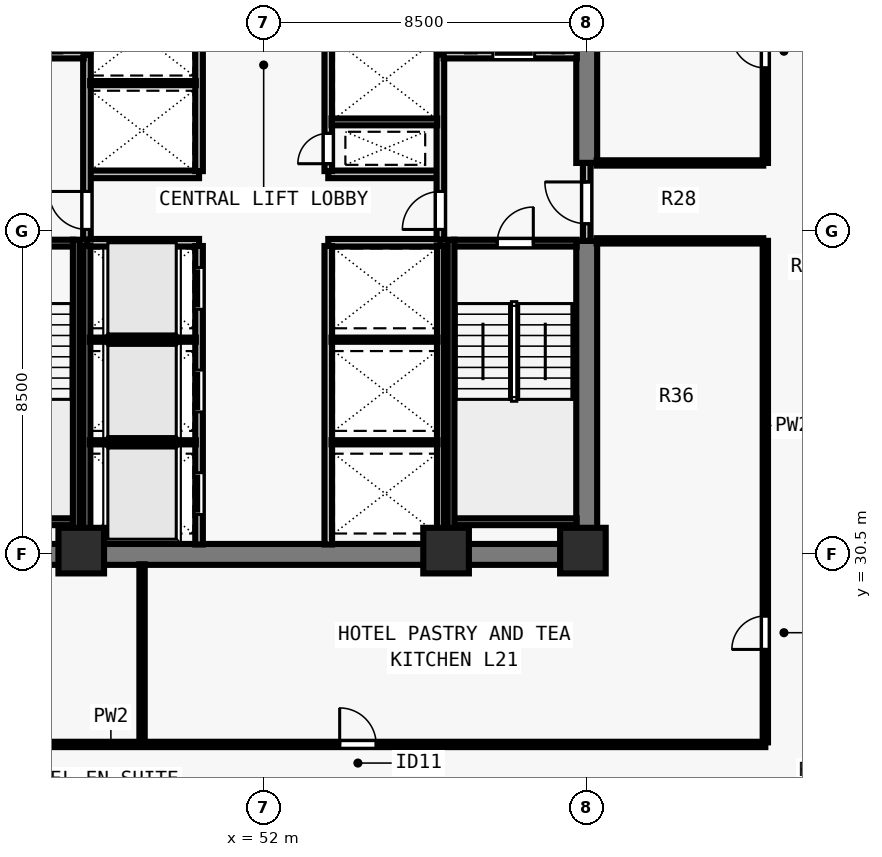
"""IFC4 building model, lengths in metres.
Left out: names, types, materials, properties, quantities, classifications, styles, units other than length and angle.
Written with IfcOpenShell. Run it as: python <this file> out.ifc"""

import sys

from ifc_helpers import new_model, si_unit, direction, frame, frame_2d, origin, origin_2d, place, context, subcontext, project, spatial, rectangle, extrude, element, fill, save


model = new_model("IFC4")
c1 = context("Model", 3, precision=1e-05, world=origin(), true_north=direction((0.0, 1.0)))
c2 = subcontext(c1, "Body", "Model", "MODEL_VIEW")
j1 = project(units=[si_unit("LENGTHUNIT", "METRE"), si_unit("PLANEANGLEUNIT", "RADIAN")], contexts=[c1])
p1 = place(None, origin())
s1 = spatial("IfcSite", under=j1, at=p1, CompositionType="ELEMENT")
p2 = place(p1, origin())
s2 = spatial("IfcBuilding", under=s1, at=p2, CompositionType="ELEMENT")
p3 = place(p2, frame((0.0, 0.0, 79.5)))
s3 = spatial("IfcBuildingStorey", under=s2, at=p3, CompositionType="ELEMENT", Elevation=79.5)
for number, where, z_axis, x_axis in (
    (1, (47.2, 30.6, 0.0), (0.0, 0.0, 1.0), (1.0, 0.0, 0.0)),
    (2, (56.8, 30.6, 0.0), (0.0, 0.0, 1.0), (1.0, 0.0, 0.0)),
    (3, (60.4, 30.6, 0.0), (0.0, 0.0, 1.0), (1.0, 0.0, 0.0)),
):
    element("IfcColumn", number, at=place(p3, frame(where, z_axis=z_axis, x_axis=x_axis)), inside=s3, PredefinedType="COLUMN", context=c2, shape_type="SweptSolid", body=[
        extrude(rectangle(XDim=1.2, YDim=1.2, at=origin_2d()), origin(), (0.0, 0.0, 1.0), 3.5),
    ])
p4 = place(p3, frame((43.225, 30.5, 0.0), z_axis=(0.0, 0.0, 1.0), x_axis=(1.0, 0.0, 0.0)))
e4 = element("IfcWall", 4, at=p4, inside=s3, PredefinedType="SHEAR", context=c2, shape_type="SweptSolid", body=[
    extrude(rectangle(XDim=17.55, YDim=0.55, at=frame_2d((8.775, 0.0))), origin(), (0.0, 0.0, 1.0), 3.28),
])
p5 = place(p3, frame((60.5, 30.765, 0.0), z_axis=(0.0, 0.0, 1.0), x_axis=(0.0, 1.0, 0.0)))
e5 = element("IfcWall", 5, at=p5, inside=s3, PredefinedType="SHEAR", context=c2, shape_type="SweptSolid", body=[
    extrude(rectangle(XDim=7.985, YDim=0.55, at=frame_2d((3.993, 0.0))), origin(), (0.0, 0.0, 1.0), 3.28),
])
p6 = place(p3, frame((60.5, 40.8, 0.0), z_axis=(0.0, 0.0, 1.0), x_axis=(0.0, 1.0, 0.0)))
e6 = element("IfcWall", 6, at=p6, inside=s3, PredefinedType="SHEAR", context=c2, shape_type="SweptSolid", body=[
    extrude(rectangle(XDim=6.435, YDim=0.55, at=frame_2d((3.218, 0.0))), origin(), (0.0, 0.0, 1.0), 3.28),
])
for number, where, z_axis, x_axis in (
    (7, (47.35, 38.7, 0.0), (0.0, 0.0, 1.0), (1.0, 0.0, 0.0)),
    (8, (47.35, 40.5, 0.0), (0.0, 0.0, 1.0), (1.0, 0.0, 0.0)),
    (9, (53.7, 38.7, 0.0), (0.0, 0.0, 1.0), (1.0, 0.0, 0.0)),
    (10, (53.7, 40.5, 0.0), (0.0, 0.0, 1.0), (1.0, 0.0, 0.0)),
):
    element("IfcWall", number, at=place(p3, frame(where, z_axis=z_axis, x_axis=x_axis)), inside=s3, PredefinedType="SOLIDWALL", context=c2, shape_type="SweptSolid", body=[
        extrude(rectangle(XDim=2.95, YDim=0.2, at=frame_2d((1.475, 0.0))), origin(), (0.0, 0.0, 1.0), 3.28),
    ])
p7 = place(p3, frame((50.3, 30.76, 0.0), z_axis=(0.0, 0.0, 1.0), x_axis=(0.0, 1.0, 0.0)))
e11 = element("IfcWall", 11, at=p7, inside=s3, PredefinedType="SOLIDWALL", context=c2, shape_type="SweptSolid", body=[
    extrude(rectangle(XDim=7.855, YDim=0.2, at=frame_2d((3.927, 0.0))), origin(), (0.0, 0.0, 1.0), 3.28),
])
p8 = place(p7, frame((0.79, 0.0, 0.0)))
e12 = element("IfcOpeningElement", 12, at=p8, cuts=e11, PredefinedType="OPENING", context=c2, shape_type="SweptSolid", body=[
    extrude(rectangle(XDim=1.1, YDim=2.2, at=frame_2d((0.55, 1.1))), frame((0.0, 0.11, 0.0), z_axis=(0.0, -1.0, 0.0), x_axis=(1.0, 0.0, 0.0)), (0.0, 0.0, 1.0), 0.22),
])
p9 = place(p7, frame((3.49, 0.0, 0.0)))
e13 = element("IfcOpeningElement", 13, at=p9, cuts=e11, PredefinedType="OPENING", context=c2, shape_type="SweptSolid", body=[
    extrude(rectangle(XDim=1.1, YDim=2.2, at=frame_2d((0.55, 1.1))), frame((0.0, 0.11, 0.0), z_axis=(0.0, -1.0, 0.0), x_axis=(1.0, 0.0, 0.0)), (0.0, 0.0, 1.0), 0.22),
])
p10 = place(p7, frame((6.19, 0.0, 0.0)))
e14 = element("IfcOpeningElement", 14, at=p10, cuts=e11, PredefinedType="OPENING", context=c2, shape_type="SweptSolid", body=[
    extrude(rectangle(XDim=1.1, YDim=2.2, at=frame_2d((0.55, 1.1))), frame((0.0, 0.11, 0.0), z_axis=(0.0, -1.0, 0.0), x_axis=(1.0, 0.0, 0.0)), (0.0, 0.0, 1.0), 0.22),
])
p11 = place(p3, frame((53.7, 30.76, 0.0), z_axis=(0.0, 0.0, 1.0), x_axis=(0.0, 1.0, 0.0)))
e15 = element("IfcWall", 15, at=p11, inside=s3, PredefinedType="SOLIDWALL", context=c2, shape_type="SweptSolid", body=[
    extrude(rectangle(XDim=7.855, YDim=0.2, at=frame_2d((3.927, 0.0))), origin(), (0.0, 0.0, 1.0), 3.28),
])
p12 = place(p3, frame((50.3, 40.585, 0.0), z_axis=(0.0, 0.0, 1.0), x_axis=(0.0, 1.0, 0.0)))
e16 = element("IfcWall", 16, at=p12, inside=s3, PredefinedType="SOLIDWALL", context=c2, shape_type="SweptSolid", body=[
    extrude(rectangle(XDim=6.655, YDim=0.2, at=frame_2d((3.328, 0.0))), origin(), (0.0, 0.0, 1.0), 3.28),
])
p13 = place(p12, frame((5.065, 0.0, 0.0)))
e17 = element("IfcOpeningElement", 17, at=p13, cuts=e16, PredefinedType="OPENING", context=c2, shape_type="SweptSolid", body=[
    extrude(rectangle(XDim=0.8, YDim=2.08, at=frame_2d((0.4, 1.04))), frame((0.0, 0.11, 0.0), z_axis=(0.0, -1.0, 0.0), x_axis=(1.0, 0.0, 0.0)), (0.0, 0.0, 1.0), 0.22),
])
p14 = place(p3, frame((53.7, 40.585, 0.0), z_axis=(0.0, 0.0, 1.0), x_axis=(0.0, 1.0, 0.0)))
e18 = element("IfcWall", 18, at=p14, inside=s3, PredefinedType="SOLIDWALL", context=c2, shape_type="SweptSolid", body=[
    extrude(rectangle(XDim=6.655, YDim=0.2, at=frame_2d((3.328, 0.0))), origin(), (0.0, 0.0, 1.0), 3.28),
])
p15 = place(p14, frame((0.195, 0.0, 0.0)))
e19 = element("IfcOpeningElement", 19, at=p15, cuts=e18, PredefinedType="OPENING", context=c2, shape_type="SweptSolid", body=[
    extrude(rectangle(XDim=0.8, YDim=2.08, at=frame_2d((0.4, 1.04))), frame((0.0, 0.11, 0.0), z_axis=(0.0, -1.0, 0.0), x_axis=(1.0, 0.0, 0.0)), (0.0, 0.0, 1.0), 0.22),
])
p16 = place(p14, frame((4.265, 0.0, 0.0)))
e20 = element("IfcOpeningElement", 20, at=p16, cuts=e18, PredefinedType="OPENING", context=c2, shape_type="SweptSolid", body=[
    extrude(rectangle(XDim=0.95, YDim=2.12, at=frame_2d((0.475, 1.06))), frame((0.0, 0.11, 0.0), z_axis=(0.0, -1.0, 0.0), x_axis=(1.0, 0.0, 0.0)), (0.0, 0.0, 1.0), 0.22),
])
p17 = place(p3, frame((47.35, 38.785, 0.0), z_axis=(0.0, 0.0, 1.0), x_axis=(0.0, 1.0, 0.0)))
e21 = element("IfcWall", 21, at=p17, inside=s3, PredefinedType="SOLIDWALL", context=c2, shape_type="SweptSolid", body=[
    extrude(rectangle(XDim=4.865, YDim=0.2, at=frame_2d((2.433, 0.0))), origin(), (0.0, 0.0, 1.0), 3.28),
])
p18 = place(p17, frame((0.265, 0.0, 0.0)))
e22 = element("IfcOpeningElement", 22, at=p18, cuts=e21, PredefinedType="OPENING", context=c2, shape_type="SweptSolid", body=[
    extrude(rectangle(XDim=1.0, YDim=2.15, at=frame_2d((0.5, 1.075))), frame((0.0, 0.11, 0.0), z_axis=(0.0, -1.0, 0.0), x_axis=(1.0, 0.0, 0.0)), (0.0, 0.0, 1.0), 0.22),
])
p19 = place(p3, frame((43.76, 43.65, 0.0), z_axis=(0.0, 0.0, 1.0), x_axis=(1.0, 0.0, 0.0)))
e23 = element("IfcWall", 23, at=p19, inside=s3, PredefinedType="SOLIDWALL", context=c2, shape_type="SweptSolid", body=[
    extrude(rectangle(XDim=3.505, YDim=0.2, at=frame_2d((1.752, 0.0))), origin(), (0.0, 0.0, 1.0), 3.28),
])
p20 = place(p19, frame((1.11, 0.0, 0.0)))
e24 = element("IfcOpeningElement", 24, at=p20, cuts=e23, PredefinedType="OPENING", context=c2, shape_type="SweptSolid", body=[
    extrude(rectangle(XDim=1.1, YDim=2.2, at=frame_2d((0.55, 1.1))), frame((0.0, 0.11, 0.0), z_axis=(0.0, -1.0, 0.0), x_axis=(1.0, 0.0, 0.0)), (0.0, 0.0, 1.0), 0.22),
])
p21 = place(p3, frame((60.5, 38.75, 0.0), z_axis=(0.0, 0.0, 1.0), x_axis=(0.0, 1.0, 0.0)))
e25 = element("IfcWall", 25, at=p21, inside=s3, PredefinedType="SOLIDWALL", context=c2, shape_type="SweptSolid", body=[
    extrude(rectangle(XDim=2.05, YDim=0.2, at=frame_2d((1.025, 0.0))), origin(), (0.0, 0.0, 1.0), 3.28),
])
p22 = place(p21, frame((0.45, 0.0, 0.0)))
e26 = element("IfcOpeningElement", 26, at=p22, cuts=e25, PredefinedType="OPENING", context=c2, shape_type="SweptSolid", body=[
    extrude(rectangle(XDim=1.1, YDim=2.15, at=frame_2d((0.55, 1.075))), frame((0.0, 0.11, 0.0), z_axis=(0.0, -1.0, 0.0), x_axis=(1.0, 0.0, 0.0)), (0.0, 0.0, 1.0), 0.22),
])
p23 = place(p3, frame((56.65, 38.785, 0.0), z_axis=(0.0, 0.0, 1.0), x_axis=(0.0, 1.0, 0.0)))
e27 = element("IfcWall", 27, at=p23, inside=s3, PredefinedType="SOLIDWALL", context=c2, shape_type="SweptSolid", body=[
    extrude(rectangle(XDim=4.865, YDim=0.2, at=frame_2d((2.433, 0.0))), origin(), (0.0, 0.0, 1.0), 3.28),
])
p24 = place(p23, frame((0.265, 0.0, 0.0)))
e28 = element("IfcOpeningElement", 28, at=p24, cuts=e27, PredefinedType="OPENING", context=c2, shape_type="SweptSolid", body=[
    extrude(rectangle(XDim=1.0, YDim=2.15, at=frame_2d((0.5, 1.075))), frame((0.0, 0.11, 0.0), z_axis=(0.0, -1.0, 0.0), x_axis=(1.0, 0.0, 0.0)), (0.0, 0.0, 1.0), 0.22),
])
p25 = place(p3, frame((56.735, 43.65, 0.0), z_axis=(0.0, 0.0, 1.0), x_axis=(1.0, 0.0, 0.0)))
e29 = element("IfcWall", 29, at=p25, inside=s3, PredefinedType="SOLIDWALL", context=c2, shape_type="SweptSolid", body=[
    extrude(rectangle(XDim=3.505, YDim=0.2, at=frame_2d((1.752, 0.0))), origin(), (0.0, 0.0, 1.0), 3.28),
])
p26 = place(p25, frame((1.295, 0.0, 0.0)))
e30 = element("IfcOpeningElement", 30, at=p26, cuts=e29, PredefinedType="OPENING", context=c2, shape_type="SweptSolid", body=[
    extrude(rectangle(XDim=1.1, YDim=2.2, at=frame_2d((0.55, 1.1))), frame((0.0, 0.11, 0.0), z_axis=(0.0, -1.0, 0.0), x_axis=(1.0, 0.0, 0.0)), (0.0, 0.0, 1.0), 0.22),
])
p27 = place(p3, frame((47.35, 30.76, 0.0), z_axis=(0.0, 0.0, 1.0), x_axis=(0.0, 1.0, 0.0)))
e31 = element("IfcWall", 31, at=p27, inside=s3, PredefinedType="SOLIDWALL", context=c2, shape_type="SweptSolid", body=[
    extrude(rectangle(XDim=7.855, YDim=0.18, at=frame_2d((3.927, 0.0))), origin(), (0.0, 0.0, 1.0), 3.28),
])
for number, where, z_axis, x_axis in (
    (32, (47.425, 33.45, 0.0), (0.0, 0.0, 1.0), (1.0, 0.0, 0.0)),
    (33, (47.425, 36.15, 0.0), (0.0, 0.0, 1.0), (1.0, 0.0, 0.0)),
):
    element("IfcWall", number, at=place(p3, frame(where, z_axis=z_axis, x_axis=x_axis)), inside=s3, PredefinedType="PARTITIONING", context=c2, shape_type="SweptSolid", body=[
        extrude(rectangle(XDim=2.79, YDim=0.11, at=frame_2d((1.395, 0.0))), origin(), (0.0, 0.0, 1.0), 3.28),
    ])
p28 = place(p3, frame((56.65, 30.76, 0.0), z_axis=(0.0, 0.0, 1.0), x_axis=(0.0, 1.0, 0.0)))
e34 = element("IfcWall", 34, at=p28, inside=s3, PredefinedType="SOLIDWALL", context=c2, shape_type="SweptSolid", body=[
    extrude(rectangle(XDim=7.855, YDim=0.18, at=frame_2d((3.927, 0.0))), origin(), (0.0, 0.0, 1.0), 3.28),
])
for number, where, z_axis, x_axis in (
    (35, (53.785, 33.45, 0.0), (0.0, 0.0, 1.0), (1.0, 0.0, 0.0)),
    (36, (53.785, 36.15, 0.0), (0.0, 0.0, 1.0), (1.0, 0.0, 0.0)),
):
    element("IfcWall", number, at=place(p3, frame(where, z_axis=z_axis, x_axis=x_axis)), inside=s3, PredefinedType="PARTITIONING", context=c2, shape_type="SweptSolid", body=[
        extrude(rectangle(XDim=2.79, YDim=0.11, at=frame_2d((1.395, 0.0))), origin(), (0.0, 0.0, 1.0), 3.28),
    ])
p29 = place(p3, frame((47.435, 42.9, 0.0), z_axis=(0.0, 0.0, 1.0), x_axis=(1.0, 0.0, 0.0)))
e37 = element("IfcWall", 37, at=p29, inside=s3, PredefinedType="PARTITIONING", context=c2, shape_type="SweptSolid", body=[
    extrude(rectangle(XDim=2.78, YDim=0.11, at=frame_2d((1.39, 0.0))), origin(), (0.0, 0.0, 1.0), 3.28),
])
p30 = place(p3, frame((53.785, 41.88, 0.0), z_axis=(0.0, 0.0, 1.0), x_axis=(1.0, 0.0, 0.0)))
e38 = element("IfcWall", 38, at=p30, inside=s3, PredefinedType="SOLIDWALL", context=c2, shape_type="SweptSolid", body=[
    extrude(rectangle(XDim=2.78, YDim=0.18, at=frame_2d((1.39, 0.0))), origin(), (0.0, 0.0, 1.0), 3.28),
])
p31 = place(p3, frame((38.8, 25.5, 0.0), z_axis=(0.0, 0.0, 1.0), x_axis=(1.0, 0.0, 0.0)))
e39 = element("IfcWall", 39, at=p31, inside=s3, PredefinedType="PARTITIONING", context=c2, shape_type="SweptSolid", body=[
    extrude(rectangle(XDim=26.4, YDim=0.14, at=frame_2d((13.2, 0.0))), origin(), (0.0, 0.0, 1.0), 3.28),
])
p32 = place(p31, frame((2.2, 0.0, 0.0)))
e40 = element("IfcOpeningElement", 40, at=p32, cuts=e39, PredefinedType="OPENING", context=c2, shape_type="SweptSolid", body=[
    extrude(rectangle(XDim=0.96, YDim=2.12, at=frame_2d((0.48, 1.06))), frame((0.0, 0.08, 0.0), z_axis=(0.0, -1.0, 0.0), x_axis=(1.0, 0.0, 0.0)), (0.0, 0.0, 1.0), 0.16),
])
p33 = place(p31, frame((15.2, 0.0, 0.0)))
e41 = element("IfcOpeningElement", 41, at=p33, cuts=e39, PredefinedType="OPENING", context=c2, shape_type="SweptSolid", body=[
    extrude(rectangle(XDim=0.96, YDim=2.12, at=frame_2d((0.48, 1.06))), frame((0.0, 0.08, 0.0), z_axis=(0.0, -1.0, 0.0), x_axis=(1.0, 0.0, 0.0)), (0.0, 0.0, 1.0), 0.16),
])
p34 = place(p3, frame((65.2, 25.555, 0.0), z_axis=(0.0, 0.0, 1.0), x_axis=(0.0, 1.0, 0.0)))
e42 = element("IfcWall", 42, at=p34, inside=s3, PredefinedType="PARTITIONING", context=c2, shape_type="SweptSolid", body=[
    extrude(rectangle(XDim=13.195, YDim=0.14, at=frame_2d((6.598, 0.0))), origin(), (0.0, 0.0, 1.0), 3.28),
])
p35 = place(p34, frame((2.445, 0.0, 0.0)))
e43 = element("IfcOpeningElement", 43, at=p35, cuts=e42, PredefinedType="OPENING", context=c2, shape_type="SweptSolid", body=[
    extrude(rectangle(XDim=0.88, YDim=2.1, at=frame_2d((0.44, 1.05))), frame((0.0, 0.08, 0.0), z_axis=(0.0, -1.0, 0.0), x_axis=(1.0, 0.0, 0.0)), (0.0, 0.0, 1.0), 0.16),
])
p36 = place(p3, frame((65.2, 40.8, 0.0), z_axis=(0.0, 0.0, 1.0), x_axis=(0.0, 1.0, 0.0)))
e44 = element("IfcWall", 44, at=p36, inside=s3, PredefinedType="PARTITIONING", context=c2, shape_type="SweptSolid", body=[
    extrude(rectangle(XDim=11.645, YDim=0.14, at=frame_2d((5.823, 0.0))), origin(), (0.0, 0.0, 1.0), 3.28),
])
p37 = place(p36, frame((2.5, 0.0, 0.0)))
e45 = element("IfcOpeningElement", 45, at=p37, cuts=e44, PredefinedType="OPENING", context=c2, shape_type="SweptSolid", body=[
    extrude(rectangle(XDim=0.88, YDim=2.1, at=frame_2d((0.44, 1.05))), frame((0.0, 0.08, 0.0), z_axis=(0.0, -1.0, 0.0), x_axis=(1.0, 0.0, 0.0)), (0.0, 0.0, 1.0), 0.16),
])
for number, where, z_axis, x_axis in (
    (46, (60.76, 38.75, 0.0), (0.0, 0.0, 1.0), (1.0, 0.0, 0.0)),
    (47, (60.76, 40.8, 0.0), (0.0, 0.0, 1.0), (1.0, 0.0, 0.0)),
):
    element("IfcWall", number, at=place(p3, frame(where, z_axis=z_axis, x_axis=x_axis)), inside=s3, PredefinedType="PARTITIONING", context=c2, shape_type="SweptSolid", body=[
        extrude(rectangle(XDim=4.385, YDim=0.14, at=frame_2d((2.192, 0.0))), origin(), (0.0, 0.0, 1.0), 3.28),
    ])
p38 = place(p3, frame((48.8, 25.555, 0.0), z_axis=(0.0, 0.0, 1.0), x_axis=(0.0, 1.0, 0.0)))
e48 = element("IfcWall", 48, at=p38, inside=s3, PredefinedType="PARTITIONING", context=c2, shape_type="SweptSolid", body=[
    extrude(rectangle(XDim=4.685, YDim=0.14, at=frame_2d((2.343, 0.0))), origin(), (0.0, 0.0, 1.0), 3.28),
])
p39 = place(p3, frame((43.765, 38.69, 0.0), z_axis=(0.0, 0.0, 1.0), x_axis=(1.0, 0.0, 0.0)))
e49 = element("IfcWall", 49, at=p39, inside=s3, PredefinedType="SOLIDWALL", context=c2, shape_type="SweptSolid", body=[
    extrude(rectangle(XDim=3.23, YDim=0.18, at=frame_2d((1.615, 0.0))), origin(), (0.0, 0.0, 1.0), 3.28),
])
p40 = place(p39, frame((1.14, 0.0, 0.0)))
e50 = element("IfcOpeningElement", 50, at=p40, cuts=e49, PredefinedType="OPENING", context=c2, shape_type="SweptSolid", body=[
    extrude(rectangle(XDim=0.95, YDim=2.15, at=frame_2d((0.475, 1.075))), frame((0.0, 0.1, 0.0), z_axis=(0.0, -1.0, 0.0), x_axis=(1.0, 0.0, 0.0)), (0.0, 0.0, 1.0), 0.2),
])
p41 = place(p3, frame((43.765, 31.36, 0.0), z_axis=(0.0, 0.0, 1.0), x_axis=(1.0, 0.0, 0.0)))
e51 = element("IfcWall", 51, at=p41, inside=s3, PredefinedType="SOLIDWALL", context=c2, shape_type="SweptSolid", body=[
    extrude(rectangle(XDim=3.23, YDim=0.18, at=frame_2d((1.615, 0.0))), origin(), (0.0, 0.0, 1.0), 3.28),
])
p42 = place(p3, frame((47.07, 38.78, 0.0), z_axis=(0.0, 0.0, 1.0), x_axis=(0.0, -1.0, 0.0)))
e52 = element("IfcWall", 52, at=p42, inside=s3, PredefinedType="SOLIDWALL", context=c2, shape_type="SweptSolid", body=[
    extrude(rectangle(XDim=8.017, YDim=0.18, at=frame_2d((4.009, 0.0))), origin(), (0.0, 0.0, 1.0), 3.28),
])
p43 = place(p3, frame((57.005, 38.69, 0.0), z_axis=(0.0, 0.0, 1.0), x_axis=(1.0, 0.0, 0.0)))
e53 = element("IfcWall", 53, at=p43, inside=s3, PredefinedType="SOLIDWALL", context=c2, shape_type="SweptSolid", body=[
    extrude(rectangle(XDim=3.23, YDim=0.18, at=frame_2d((1.615, 0.0))), origin(), (0.0, 0.0, 1.0), 3.28),
])
p44 = place(p43, frame((1.14, 0.0, 0.0)))
e54 = element("IfcOpeningElement", 54, at=p44, cuts=e53, PredefinedType="OPENING", context=c2, shape_type="SweptSolid", body=[
    extrude(rectangle(XDim=0.95, YDim=2.15, at=frame_2d((0.475, 1.075))), frame((0.0, 0.1, 0.0), z_axis=(0.0, -1.0, 0.0), x_axis=(1.0, 0.0, 0.0)), (0.0, 0.0, 1.0), 0.2),
])
p45 = place(p3, frame((57.005, 31.36, 0.0), z_axis=(0.0, 0.0, 1.0), x_axis=(1.0, 0.0, 0.0)))
e55 = element("IfcWall", 55, at=p45, inside=s3, PredefinedType="SOLIDWALL", context=c2, shape_type="SweptSolid", body=[
    extrude(rectangle(XDim=3.23, YDim=0.18, at=frame_2d((1.615, 0.0))), origin(), (0.0, 0.0, 1.0), 3.28),
])
p46 = place(p3, frame((56.93, 38.78, 0.0), z_axis=(0.0, 0.0, 1.0), x_axis=(0.0, -1.0, 0.0)))
e56 = element("IfcWall", 56, at=p46, inside=s3, PredefinedType="SOLIDWALL", context=c2, shape_type="SweptSolid", body=[
    extrude(rectangle(XDim=8.017, YDim=0.18, at=frame_2d((4.009, 0.0))), origin(), (0.0, 0.0, 1.0), 3.28),
])
p47 = place(p18, origin())
e57 = element("IfcDoor", 57, at=p47, inside=s3, OperationType="SINGLE_SWING_RIGHT", PredefinedType="DOOR", context=c2, shape_type="SweptSolid", body=[
    extrude(rectangle(XDim=1.0, YDim=2.15, at=frame_2d((0.5, 1.075))), frame((0.0, 0.025, 0.0), z_axis=(0.0, -1.0, 0.0), x_axis=(1.0, 0.0, 0.0)), (0.0, 0.0, 1.0), 0.05),
])
fill(e22, e57)
p48 = place(p22, origin())
e58 = element("IfcDoor", 58, at=p48, inside=s3, OperationType="SINGLE_SWING_RIGHT", PredefinedType="DOOR", context=c2, shape_type="SweptSolid", body=[
    extrude(rectangle(XDim=1.1, YDim=2.15, at=frame_2d((0.55, 1.075))), frame((0.0, 0.025, 0.0), z_axis=(0.0, -1.0, 0.0), x_axis=(1.0, 0.0, 0.0)), (0.0, 0.0, 1.0), 0.05),
])
fill(e26, e58)
p49 = place(p24, origin())
e59 = element("IfcDoor", 59, at=p49, inside=s3, OperationType="SINGLE_SWING_LEFT", PredefinedType="DOOR", context=c2, shape_type="SweptSolid", body=[
    extrude(rectangle(XDim=1.0, YDim=2.15, at=frame_2d((0.5, 1.075))), frame((0.0, 0.025, 0.0), z_axis=(0.0, -1.0, 0.0), x_axis=(1.0, 0.0, 0.0)), (0.0, 0.0, 1.0), 0.05),
])
fill(e28, e59)
p50 = place(p26, origin())
e60 = element("IfcDoor", 60, at=p50, inside=s3, OperationType="SLIDING_TO_LEFT", PredefinedType="DOOR", context=c2, shape_type="SweptSolid", body=[
    extrude(rectangle(XDim=1.1, YDim=2.2, at=frame_2d((0.55, 1.1))), frame((0.0, 0.025, 0.0), z_axis=(0.0, -1.0, 0.0), x_axis=(1.0, 0.0, 0.0)), (0.0, 0.0, 1.0), 0.05),
])
fill(e30, e60)
p51 = place(p8, origin())
e61 = element("IfcDoor", 61, at=p51, inside=s3, OperationType="SLIDING_TO_LEFT", PredefinedType="DOOR", context=c2, shape_type="SweptSolid", body=[
    extrude(rectangle(XDim=1.1, YDim=2.2, at=frame_2d((0.55, 1.1))), frame((0.0, 0.025, 0.0), z_axis=(0.0, -1.0, 0.0), x_axis=(1.0, 0.0, 0.0)), (0.0, 0.0, 1.0), 0.05),
])
fill(e12, e61)
p52 = place(p9, origin())
e62 = element("IfcDoor", 62, at=p52, inside=s3, OperationType="SLIDING_TO_LEFT", PredefinedType="DOOR", context=c2, shape_type="SweptSolid", body=[
    extrude(rectangle(XDim=1.1, YDim=2.2, at=frame_2d((0.55, 1.1))), frame((0.0, 0.025, 0.0), z_axis=(0.0, -1.0, 0.0), x_axis=(1.0, 0.0, 0.0)), (0.0, 0.0, 1.0), 0.05),
])
fill(e13, e62)
p53 = place(p10, origin())
e63 = element("IfcDoor", 63, at=p53, inside=s3, OperationType="SLIDING_TO_LEFT", PredefinedType="DOOR", context=c2, shape_type="SweptSolid", body=[
    extrude(rectangle(XDim=1.1, YDim=2.2, at=frame_2d((0.55, 1.1))), frame((0.0, 0.025, 0.0), z_axis=(0.0, -1.0, 0.0), x_axis=(1.0, 0.0, 0.0)), (0.0, 0.0, 1.0), 0.05),
])
fill(e14, e63)
p54 = place(p15, origin())
e64 = element("IfcDoor", 64, at=p54, inside=s3, OperationType="SINGLE_SWING_LEFT", PredefinedType="DOOR", context=c2, shape_type="SweptSolid", body=[
    extrude(rectangle(XDim=0.8, YDim=2.08, at=frame_2d((0.4, 1.04))), frame((0.0, 0.025, 0.0), z_axis=(0.0, -1.0, 0.0), x_axis=(1.0, 0.0, 0.0)), (0.0, 0.0, 1.0), 0.05),
])
fill(e19, e64)
p55 = place(p33, origin())
e65 = element("IfcDoor", 65, at=p55, inside=s3, OperationType="SINGLE_SWING_LEFT", PredefinedType="DOOR", context=c2, shape_type="SweptSolid", body=[
    extrude(rectangle(XDim=0.96, YDim=2.12, at=frame_2d((0.48, 1.06))), frame((0.0, 0.025, 0.0), z_axis=(0.0, -1.0, 0.0), x_axis=(1.0, 0.0, 0.0)), (0.0, 0.0, 1.0), 0.05),
])
fill(e41, e65)
p56 = place(p35, origin())
e66 = element("IfcDoor", 66, at=p56, inside=s3, OperationType="SINGLE_SWING_LEFT", PredefinedType="DOOR", context=c2, shape_type="SweptSolid", body=[
    extrude(rectangle(XDim=0.88, YDim=2.1, at=frame_2d((0.44, 1.05))), frame((0.0, 0.025, 0.0), z_axis=(0.0, -1.0, 0.0), x_axis=(1.0, 0.0, 0.0)), (0.0, 0.0, 1.0), 0.05),
])
fill(e43, e66)
p57 = place(p37, origin())
e67 = element("IfcDoor", 67, at=p57, inside=s3, OperationType="SINGLE_SWING_RIGHT", PredefinedType="DOOR", context=c2, shape_type="SweptSolid", body=[
    extrude(rectangle(XDim=0.88, YDim=2.1, at=frame_2d((0.44, 1.05))), frame((0.0, 0.025, 0.0), z_axis=(0.0, -1.0, 0.0), x_axis=(1.0, 0.0, 0.0)), (0.0, 0.0, 1.0), 0.05),
])
fill(e45, e67)
p58 = place(p44, origin())
e68 = element("IfcDoor", 68, at=p58, inside=s3, OperationType="SINGLE_SWING_RIGHT", PredefinedType="DOOR", context=c2, shape_type="SweptSolid", body=[
    extrude(rectangle(XDim=0.95, YDim=2.15, at=frame_2d((0.475, 1.075))), frame((0.0, 0.025, 0.0), z_axis=(0.0, -1.0, 0.0), x_axis=(1.0, 0.0, 0.0)), (0.0, 0.0, 1.0), 0.05),
])
fill(e54, e68)
save(model, sys.argv[1])
